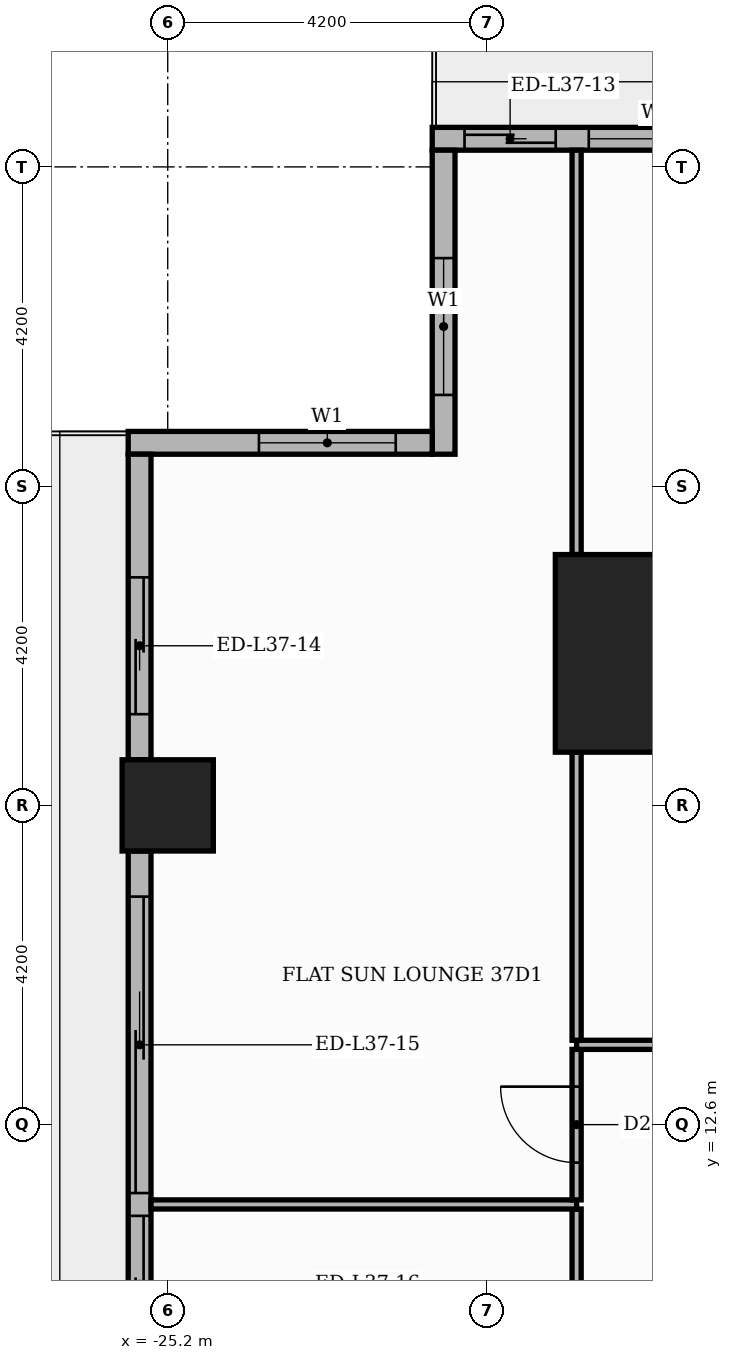
"""IFC4 building model, lengths in metres.
Left out: names, types, materials, properties, quantities, classifications, styles, units other than length and angle.
Written with IfcOpenShell. Run it as: python <this file> out.ifc"""

import sys

from ifc_helpers import new_model, si_unit, direction, frame, frame_2d, origin, origin_2d, place, context, subcontext, project, spatial, rectangle, extrude, element, fill, save


model = new_model("IFC4")
c1 = context("Model", 3, precision=1e-05, world=origin(), true_north=direction((0.0, 1.0)))
c2 = subcontext(c1, "Body", "Model", "MODEL_VIEW")
j1 = project(units=[si_unit("LENGTHUNIT", "METRE"), si_unit("PLANEANGLEUNIT", "RADIAN")], contexts=[c1])
p1 = place(None, origin())
s1 = spatial("IfcSite", under=j1, at=p1, CompositionType="ELEMENT")
p2 = place(p1, origin())
s2 = spatial("IfcBuilding", under=s1, at=p2, CompositionType="ELEMENT")
p3 = place(p2, frame((0.0, 0.0, 157.2)))
s3 = spatial("IfcBuildingStorey", under=s2, at=p3, CompositionType="ELEMENT", Elevation=157.2)
p4 = place(p3, frame((-18.8, 18.8, 0.0), z_axis=(0.0, 0.0, 1.0), x_axis=(1.0, 0.0, 0.0)))
e1 = element("IfcColumn", 1, at=p4, inside=s3, PredefinedType="COLUMN", context=c2, shape_type="SweptSolid", body=[
    extrude(rectangle(XDim=2.6, YDim=2.6, at=origin_2d()), origin(), (0.0, 0.0, 1.0), 3.9),
])
p5 = place(p3, frame((-25.2, 16.8, 0.0), z_axis=(0.0, 0.0, 1.0), x_axis=(1.0, 0.0, 0.0)))
e2 = element("IfcColumn", 2, at=p5, inside=s3, PredefinedType="COLUMN", context=c2, shape_type="SweptSolid", body=[
    extrude(rectangle(XDim=1.2, YDim=1.2, at=origin_2d()), origin(), (0.0, 0.0, 1.0), 3.9),
])
p6 = place(p3, frame((-17.4, 25.57, 0.0), z_axis=(0.0, 0.0, 1.0), x_axis=(-1.0, 0.0, 0.0)))
e3 = element("IfcWall", 3, at=p6, inside=s3, PredefinedType="STANDARD", context=c2, shape_type="SweptSolid", body=[
    extrude(rectangle(XDim=4.32, YDim=0.3, at=frame_2d((2.16, 0.0))), origin(), (0.0, 0.0, 1.0), 3.48),
])
p7 = place(p6, frame((2.695, 0.0, 0.0)))
e4 = element("IfcOpeningElement", 4, at=p7, cuts=e3, PredefinedType="OPENING", context=c2, shape_type="SweptSolid", body=[
    extrude(rectangle(XDim=1.2, YDim=2.4, at=frame_2d((0.6, 1.2))), frame((0.0, 0.16, 0.0), z_axis=(0.0, -1.0, 0.0), x_axis=(1.0, 0.0, 0.0)), (0.0, 0.0, 1.0), 0.32),
])
p8 = place(p6, frame((0.46, 0.0, 0.9)))
e5 = element("IfcOpeningElement", 5, at=p8, cuts=e3, PredefinedType="OPENING", context=c2, shape_type="SweptSolid", body=[
    extrude(rectangle(XDim=1.8, YDim=2.1, at=frame_2d((0.9, 1.05))), frame((0.0, 0.16, 0.0), z_axis=(0.0, -1.0, 0.0), x_axis=(1.0, 0.0, 0.0)), (0.0, 0.0, 1.0), 0.32),
])
p9 = place(p3, frame((-21.57, 25.42, 0.0), z_axis=(0.0, 0.0, 1.0), x_axis=(0.0, -1.0, 0.0)))
e6 = element("IfcWall", 6, at=p9, inside=s3, PredefinedType="STANDARD", context=c2, shape_type="SweptSolid", body=[
    extrude(rectangle(XDim=4.0, YDim=0.3, at=frame_2d((2.0, 0.0))), origin(), (0.0, 0.0, 1.0), 3.48),
])
p10 = place(p9, frame((1.42, 0.0, 0.9)))
e7 = element("IfcOpeningElement", 7, at=p10, cuts=e6, PredefinedType="OPENING", context=c2, shape_type="SweptSolid", body=[
    extrude(rectangle(XDim=1.8, YDim=2.1, at=frame_2d((0.9, 1.05))), frame((0.0, 0.16, 0.0), z_axis=(0.0, -1.0, 0.0), x_axis=(1.0, 0.0, 0.0)), (0.0, 0.0, 1.0), 0.32),
])
p11 = place(p3, frame((-21.72, 21.57, 0.0), z_axis=(0.0, 0.0, 1.0), x_axis=(-1.0, 0.0, 0.0)))
e8 = element("IfcWall", 8, at=p11, inside=s3, PredefinedType="STANDARD", context=c2, shape_type="SweptSolid", body=[
    extrude(rectangle(XDim=4.0, YDim=0.3, at=frame_2d((2.0, 0.0))), origin(), (0.0, 0.0, 1.0), 3.48),
])
p12 = place(p11, frame((0.48, 0.0, 0.9)))
e9 = element("IfcOpeningElement", 9, at=p12, cuts=e8, PredefinedType="OPENING", context=c2, shape_type="SweptSolid", body=[
    extrude(rectangle(XDim=1.8, YDim=2.1, at=frame_2d((0.9, 1.05))), frame((0.0, 0.16, 0.0), z_axis=(0.0, -1.0, 0.0), x_axis=(1.0, 0.0, 0.0)), (0.0, 0.0, 1.0), 0.32),
])
p13 = place(p3, frame((-25.57, 21.42, 0.0), z_axis=(0.0, 0.0, 1.0), x_axis=(0.0, -1.0, 0.0)))
e10 = element("IfcWall", 10, at=p13, inside=s3, PredefinedType="STANDARD", context=c2, shape_type="SweptSolid", body=[
    extrude(rectangle(XDim=4.02, YDim=0.3, at=frame_2d((2.01, 0.0))), origin(), (0.0, 0.0, 1.0), 3.48),
])
p14 = place(p13, frame((1.62, 0.0, 0.0)))
e11 = element("IfcOpeningElement", 11, at=p14, cuts=e10, PredefinedType="OPENING", context=c2, shape_type="SweptSolid", body=[
    extrude(rectangle(XDim=1.8, YDim=2.4, at=frame_2d((0.9, 1.2))), frame((0.0, 0.16, 0.0), z_axis=(0.0, -1.0, 0.0), x_axis=(1.0, 0.0, 0.0)), (0.0, 0.0, 1.0), 0.32),
])
p15 = place(p3, frame((-25.57, 16.2, 0.0), z_axis=(0.0, 0.0, 1.0), x_axis=(0.0, -1.0, 0.0)))
e12 = element("IfcWall", 12, at=p15, inside=s3, PredefinedType="STANDARD", context=c2, shape_type="SweptSolid", body=[
    extrude(rectangle(XDim=7.2, YDim=0.3, at=frame_2d((3.6, 0.0))), origin(), (0.0, 0.0, 1.0), 3.48),
])
p16 = place(p15, frame((0.6, 0.0, 0.0)))
e13 = element("IfcOpeningElement", 13, at=p16, cuts=e12, PredefinedType="OPENING", context=c2, shape_type="SweptSolid", body=[
    extrude(rectangle(XDim=3.9, YDim=2.4, at=frame_2d((1.95, 1.2))), frame((0.0, 0.16, 0.0), z_axis=(0.0, -1.0, 0.0), x_axis=(1.0, 0.0, 0.0)), (0.0, 0.0, 1.0), 0.32),
])
p17 = place(p15, frame((4.8, 0.0, 0.0)))
e14 = element("IfcOpeningElement", 14, at=p17, cuts=e12, PredefinedType="OPENING", context=c2, shape_type="SweptSolid", body=[
    extrude(rectangle(XDim=1.8, YDim=2.4, at=frame_2d((0.9, 1.2))), frame((0.0, 0.16, 0.0), z_axis=(0.0, -1.0, 0.0), x_axis=(1.0, 0.0, 0.0)), (0.0, 0.0, 1.0), 0.32),
])
p18 = place(p3, frame((-19.82, 3.21, 0.0), z_axis=(0.0, 0.0, 1.0), x_axis=(0.0, 1.0, 0.0)))
e15 = element("IfcWall", 15, at=p18, inside=s3, PredefinedType="PARTITIONING", context=c2, shape_type="SweptSolid", body=[
    extrude(rectangle(XDim=8.28, YDim=0.12, at=frame_2d((4.14, 0.0))), origin(), (0.0, 0.0, 1.0), 3.48),
])
p19 = place(p18, frame((3.64, 0.0, 0.0)))
e16 = element("IfcOpeningElement", 16, at=p19, cuts=e15, PredefinedType="OPENING", context=c2, shape_type="SweptSolid", body=[
    extrude(rectangle(XDim=1.0, YDim=2.1, at=frame_2d((0.5, 1.05))), frame((0.0, 0.07, 0.0), z_axis=(0.0, -1.0, 0.0), x_axis=(1.0, 0.0, 0.0)), (0.0, 0.0, 1.0), 0.14),
])
p20 = place(p3, frame((-25.42, 11.55, 0.0), z_axis=(0.0, 0.0, 1.0), x_axis=(1.0, 0.0, 0.0)))
e17 = element("IfcWall", 17, at=p20, inside=s3, PredefinedType="PARTITIONING", context=c2, shape_type="SweptSolid", body=[
    extrude(rectangle(XDim=5.6, YDim=0.12, at=frame_2d((2.8, 0.0))), origin(), (0.0, 0.0, 1.0), 3.48),
])
p21 = place(p3, frame((-19.82, 11.61, 0.0), z_axis=(0.0, 0.0, 1.0), x_axis=(0.0, 1.0, 0.0)))
e18 = element("IfcWall", 18, at=p21, inside=s3, PredefinedType="PARTITIONING", context=c2, shape_type="SweptSolid", body=[
    extrude(rectangle(XDim=1.98, YDim=0.12, at=frame_2d((0.99, 0.0))), origin(), (0.0, 0.0, 1.0), 3.48),
])
p22 = place(p21, frame((0.49, 0.0, 0.0)))
e19 = element("IfcOpeningElement", 19, at=p22, cuts=e18, PredefinedType="OPENING", context=c2, shape_type="SweptSolid", body=[
    extrude(rectangle(XDim=1.0, YDim=2.1, at=frame_2d((0.5, 1.05))), frame((0.0, 0.07, 0.0), z_axis=(0.0, -1.0, 0.0), x_axis=(1.0, 0.0, 0.0)), (0.0, 0.0, 1.0), 0.14),
])
p23 = place(p3, frame((-19.82, 13.65, 0.0), z_axis=(0.0, 0.0, 1.0), x_axis=(1.0, 0.0, 0.0)))
e20 = element("IfcWall", 20, at=p23, inside=s3, PredefinedType="PARTITIONING", context=c2, shape_type="SweptSolid", body=[
    extrude(rectangle(XDim=6.17, YDim=0.12, at=frame_2d((3.085, 0.0))), origin(), (0.0, 0.0, 1.0), 3.48),
])
p24 = place(p23, frame((2.635, 0.0, 0.0)))
e21 = element("IfcOpeningElement", 21, at=p24, cuts=e20, PredefinedType="OPENING", context=c2, shape_type="SweptSolid", body=[
    extrude(rectangle(XDim=0.9, YDim=2.1, at=frame_2d((0.45, 1.05))), frame((0.0, 0.07, 0.0), z_axis=(0.0, -1.0, 0.0), x_axis=(1.0, 0.0, 0.0)), (0.0, 0.0, 1.0), 0.14),
])
p25 = place(p3, frame((-19.82, 13.71, 0.0), z_axis=(0.0, 0.0, 1.0), x_axis=(0.0, 1.0, 0.0)))
e22 = element("IfcWall", 22, at=p25, inside=s3, PredefinedType="PARTITIONING", context=c2, shape_type="SweptSolid", body=[
    extrude(rectangle(XDim=3.79, YDim=0.12, at=frame_2d((1.895, 0.0))), origin(), (0.0, 0.0, 1.0), 3.48),
])
p26 = place(p3, frame((-19.82, 20.1, 0.0), z_axis=(0.0, 0.0, 1.0), x_axis=(0.0, 1.0, 0.0)))
e23 = element("IfcWall", 23, at=p26, inside=s3, PredefinedType="PARTITIONING", context=c2, shape_type="SweptSolid", body=[
    extrude(rectangle(XDim=5.32, YDim=0.12, at=frame_2d((2.66, 0.0))), origin(), (0.0, 0.0, 1.0), 3.48),
])
p27 = place(p7, origin())
e24 = element("IfcDoor", 24, at=p27, inside=s3, OperationType="SLIDING_TO_LEFT", PredefinedType="DOOR", context=c2, shape_type="SweptSolid", body=[
    extrude(rectangle(XDim=1.2, YDim=2.4, at=frame_2d((0.6, 1.2))), frame((0.0, 0.025, 0.0), z_axis=(0.0, -1.0, 0.0), x_axis=(1.0, 0.0, 0.0)), (0.0, 0.0, 1.0), 0.05),
])
fill(e4, e24)
p28 = place(p8, origin())
e25 = element("IfcWindow", 25, at=p28, inside=s3, PartitioningType="SINGLE_PANEL", PredefinedType="WINDOW", context=c2, shape_type="SweptSolid", body=[
    extrude(rectangle(XDim=1.8, YDim=2.1, at=frame_2d((0.9, 1.05))), frame((0.0, 0.03, 0.0), z_axis=(0.0, -1.0, 0.0), x_axis=(1.0, 0.0, 0.0)), (0.0, 0.0, 1.0), 0.06),
])
fill(e5, e25)
p29 = place(p10, origin())
e26 = element("IfcWindow", 26, at=p29, inside=s3, PartitioningType="SINGLE_PANEL", PredefinedType="WINDOW", context=c2, shape_type="SweptSolid", body=[
    extrude(rectangle(XDim=1.8, YDim=2.1, at=frame_2d((0.9, 1.05))), frame((0.0, 0.03, 0.0), z_axis=(0.0, -1.0, 0.0), x_axis=(1.0, 0.0, 0.0)), (0.0, 0.0, 1.0), 0.06),
])
fill(e7, e26)
p30 = place(p12, origin())
e27 = element("IfcWindow", 27, at=p30, inside=s3, PartitioningType="SINGLE_PANEL", PredefinedType="WINDOW", context=c2, shape_type="SweptSolid", body=[
    extrude(rectangle(XDim=1.8, YDim=2.1, at=frame_2d((0.9, 1.05))), frame((0.0, 0.03, 0.0), z_axis=(0.0, -1.0, 0.0), x_axis=(1.0, 0.0, 0.0)), (0.0, 0.0, 1.0), 0.06),
])
fill(e9, e27)
p31 = place(p14, origin())
e28 = element("IfcDoor", 28, at=p31, inside=s3, OperationType="SLIDING_TO_RIGHT", PredefinedType="DOOR", context=c2, shape_type="SweptSolid", body=[
    extrude(rectangle(XDim=1.8, YDim=2.4, at=frame_2d((0.9, 1.2))), frame((0.0, 0.025, 0.0), z_axis=(0.0, -1.0, 0.0), x_axis=(1.0, 0.0, 0.0)), (0.0, 0.0, 1.0), 0.05),
])
fill(e11, e28)
p32 = place(p16, origin())
e29 = element("IfcDoor", 29, at=p32, inside=s3, OperationType="SLIDING_TO_LEFT", PredefinedType="DOOR", context=c2, shape_type="SweptSolid", body=[
    extrude(rectangle(XDim=3.9, YDim=2.4, at=frame_2d((1.95, 1.2))), frame((0.0, 0.025, 0.0), z_axis=(0.0, -1.0, 0.0), x_axis=(1.0, 0.0, 0.0)), (0.0, 0.0, 1.0), 0.05),
])
fill(e13, e29)
p33 = place(p17, origin())
e30 = element("IfcDoor", 30, at=p33, inside=s3, OperationType="SLIDING_TO_RIGHT", PredefinedType="DOOR", context=c2, shape_type="SweptSolid", body=[
    extrude(rectangle(XDim=1.8, YDim=2.4, at=frame_2d((0.9, 1.2))), frame((0.0, 0.025, 0.0), z_axis=(0.0, -1.0, 0.0), x_axis=(1.0, 0.0, 0.0)), (0.0, 0.0, 1.0), 0.05),
])
fill(e14, e30)
p34 = place(p22, origin())
e31 = element("IfcDoor", 31, at=p34, inside=s3, OperationType="SINGLE_SWING_RIGHT", PredefinedType="DOOR", context=c2, shape_type="SweptSolid", body=[
    extrude(rectangle(XDim=1.0, YDim=2.1, at=frame_2d((0.5, 1.05))), frame((0.0, 0.025, 0.0), z_axis=(0.0, -1.0, 0.0), x_axis=(1.0, 0.0, 0.0)), (0.0, 0.0, 1.0), 0.05),
])
fill(e19, e31)
save(model, sys.argv[1])
